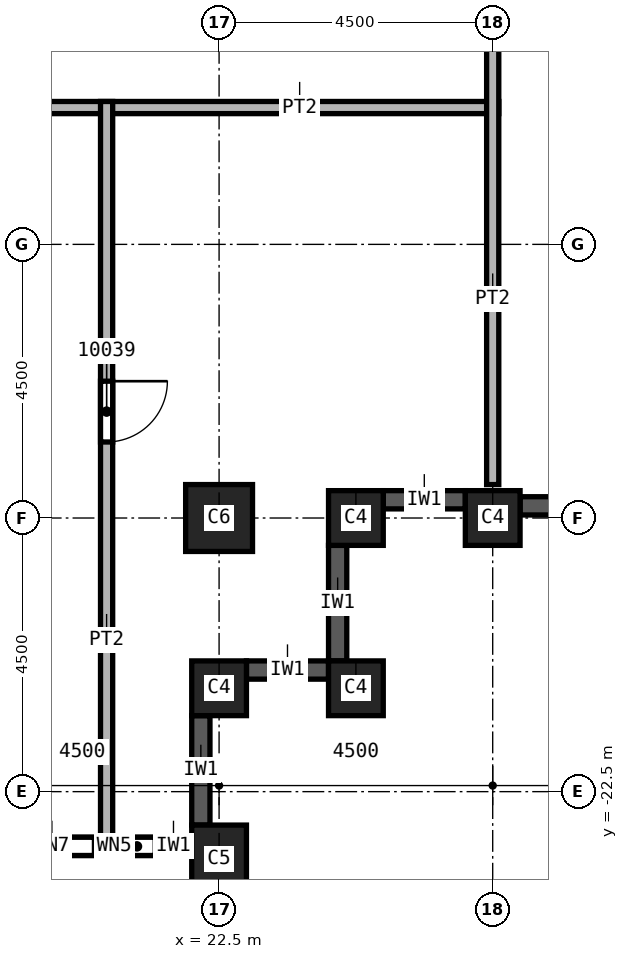
"""IFC4 building model, lengths in metres.
Left out: names, types, materials, properties, quantities, classifications, styles, units other than length and angle.
Written with IfcOpenShell. Run it as: python <this file> out.ifc"""

import sys

from ifc_helpers import new_model, si_unit, direction, frame, frame_2d, origin, origin_2d, place, context, subcontext, project, spatial, rectangle, extrude, element, fill, save


model = new_model("IFC4")
c1 = context("Model", 3, precision=1e-05, world=origin(), true_north=direction((0.0, 1.0)))
c2 = subcontext(c1, "Body", "Model", "MODEL_VIEW")
j1 = project(units=[si_unit("LENGTHUNIT", "METRE"), si_unit("PLANEANGLEUNIT", "RADIAN")], contexts=[c1])
p1 = place(None, origin())
s1 = spatial("IfcSite", under=j1, at=p1, CompositionType="ELEMENT")
p2 = place(p1, origin())
s2 = spatial("IfcBuilding", under=s1, at=p2, CompositionType="ELEMENT")
p3 = place(p2, frame((0.0, 0.0, 170.0)))
s3 = spatial("IfcBuildingStorey", under=s2, at=p3, CompositionType="ELEMENT", Elevation=170.0)
p4 = place(p3, frame((22.5, -18.0, 0.0), z_axis=(0.0, 0.0, 1.0), x_axis=(1.0, 0.0, 0.0)))
e1 = element("IfcColumn", 1, at=p4, inside=s3, PredefinedType="COLUMN", context=c2, shape_type="SweptSolid", body=[
    extrude(rectangle(XDim=1.1, YDim=1.1, at=origin_2d()), origin(), (0.0, 0.0, 1.0), 3.7),
])
p5 = place(p3, frame((27.0, -18.0, 0.0), z_axis=(0.0, 0.0, 1.0), x_axis=(1.0, 0.0, 0.0)))
e2 = element("IfcColumn", 2, at=p5, inside=s3, PredefinedType="COLUMN", context=c2, shape_type="SweptSolid", body=[
    extrude(rectangle(XDim=0.9, YDim=0.9, at=origin_2d()), origin(), (0.0, 0.0, 1.0), 3.7),
])
p6 = place(p3, frame((22.5, -23.6, 0.0), z_axis=(0.0, 0.0, 1.0), x_axis=(1.0, 0.0, 0.0)))
e3 = element("IfcColumn", 3, at=p6, inside=s3, PredefinedType="COLUMN", context=c2, shape_type="SweptSolid", body=[
    extrude(rectangle(XDim=0.9, YDim=1.1, at=origin_2d()), origin(), (0.0, 0.0, 1.0), 3.7),
])
for number, where, z_axis, x_axis in (
    (4, (22.5, -20.8, 0.0), (0.0, 0.0, 1.0), (1.0, 0.0, 0.0)),
    (5, (24.75, -20.8, 0.0), (0.0, 0.0, 1.0), (1.0, 0.0, 0.0)),
    (6, (24.75, -18.0, 0.0), (0.0, 0.0, 1.0), (1.0, 0.0, 0.0)),
):
    element("IfcColumn", number, at=place(p3, frame(where, z_axis=z_axis, x_axis=x_axis)), inside=s3, PredefinedType="COLUMN", context=c2, shape_type="SweptSolid", body=[
        extrude(rectangle(XDim=0.9, YDim=0.9, at=origin_2d()), origin(), (0.0, 0.0, 1.0), 3.7),
    ])
p7 = place(p3, frame((18.45, -23.4, 0.0), z_axis=(0.0, 0.0, 1.0), x_axis=(1.0, 0.0, 0.0)))
e7 = element("IfcWall", 7, at=p7, inside=s3, PredefinedType="SOLIDWALL", context=c2, shape_type="SweptSolid", body=[
    extrude(rectangle(XDim=3.6, YDim=0.3, at=frame_2d((1.8, 0.0))), origin(), (0.0, 0.0, 1.0), 3.1),
])
p8 = place(p7, frame((0.6, 0.0, 0.8)))
e8 = element("IfcOpeningElement", 8, at=p8, cuts=e7, PredefinedType="OPENING", context=c2, shape_type="SweptSolid", body=[
    extrude(rectangle(XDim=1.4, YDim=1.95, at=frame_2d((0.7, 0.975))), frame((0.0, 0.15, 0.0), z_axis=(0.0, -1.0, 0.0), x_axis=(1.0, 0.0, 0.0)), (0.0, 0.0, 1.0), 0.3),
])
p9 = place(p7, frame((2.4, 0.0, 0.8)))
e9 = element("IfcOpeningElement", 9, at=p9, cuts=e7, PredefinedType="OPENING", context=c2, shape_type="SweptSolid", body=[
    extrude(rectangle(XDim=0.6, YDim=1.95, at=frame_2d((0.3, 0.975))), frame((0.0, 0.15, 0.0), z_axis=(0.0, -1.0, 0.0), x_axis=(1.0, 0.0, 0.0)), (0.0, 0.0, 1.0), 0.3),
])
p10 = place(p3, frame((22.2, -23.05, 0.0), z_axis=(0.0, 0.0, 1.0), x_axis=(0.0, 1.0, 0.0)))
e10 = element("IfcWall", 10, at=p10, inside=s3, PredefinedType="SOLIDWALL", context=c2, shape_type="SweptSolid", body=[
    extrude(rectangle(XDim=1.8, YDim=0.3, at=frame_2d((0.9, 0.0))), origin(), (0.0, 0.0, 1.0), 3.1),
])
p11 = place(p3, frame((22.95, -20.5, 0.0), z_axis=(0.0, 0.0, 1.0), x_axis=(1.0, 0.0, 0.0)))
e11 = element("IfcWall", 11, at=p11, inside=s3, PredefinedType="SOLIDWALL", context=c2, shape_type="SweptSolid", body=[
    extrude(rectangle(XDim=1.35, YDim=0.3, at=frame_2d((0.675, 0.0))), origin(), (0.0, 0.0, 1.0), 3.1),
])
p12 = place(p3, frame((24.45, -20.35, 0.0), z_axis=(0.0, 0.0, 1.0), x_axis=(0.0, 1.0, 0.0)))
e12 = element("IfcWall", 12, at=p12, inside=s3, PredefinedType="SOLIDWALL", context=c2, shape_type="SweptSolid", body=[
    extrude(rectangle(XDim=1.9, YDim=0.3, at=frame_2d((0.95, 0.0))), origin(), (0.0, 0.0, 1.0), 3.1),
])
p13 = place(p3, frame((25.2, -17.7, 0.0), z_axis=(0.0, 0.0, 1.0), x_axis=(1.0, 0.0, 0.0)))
e13 = element("IfcWall", 13, at=p13, inside=s3, PredefinedType="SOLIDWALL", context=c2, shape_type="SweptSolid", body=[
    extrude(rectangle(XDim=1.35, YDim=0.3, at=frame_2d((0.675, 0.0))), origin(), (0.0, 0.0, 1.0), 3.1),
])
p14 = place(p3, frame((27.45, -17.8, 0.0), z_axis=(0.0, 0.0, 1.0), x_axis=(1.0, 0.0, 0.0)))
e14 = element("IfcWall", 14, at=p14, inside=s3, PredefinedType="SOLIDWALL", context=c2, shape_type="SweptSolid", body=[
    extrude(rectangle(XDim=3.6, YDim=0.3, at=frame_2d((1.8, 0.0))), origin(), (0.0, 0.0, 1.0), 3.1),
])
p15 = place(p14, frame((0.6, 0.0, 0.8)))
e15 = element("IfcOpeningElement", 15, at=p15, cuts=e14, PredefinedType="OPENING", context=c2, shape_type="SweptSolid", body=[
    extrude(rectangle(XDim=2.4, YDim=1.95, at=frame_2d((1.2, 0.975))), frame((0.0, 0.15, 0.0), z_axis=(0.0, -1.0, 0.0), x_axis=(1.0, 0.0, 0.0)), (0.0, 0.0, 1.0), 0.3),
])
p16 = place(p3, frame((15.4, -11.25, 0.0), z_axis=(0.0, 0.0, 1.0), x_axis=(1.0, 0.0, 0.0)))
e16 = element("IfcWall", 16, at=p16, inside=s3, PredefinedType="PARTITIONING", context=c2, shape_type="SweptSolid", body=[
    extrude(rectangle(XDim=11.7, YDim=0.2, at=frame_2d((5.85, 0.0))), origin(), (0.0, 0.0, 1.0), 3.7),
])
p17 = place(p3, frame((20.65, -11.15, 0.0), z_axis=(0.0, 0.0, 1.0), x_axis=(0.0, -1.0, 0.0)))
e17 = element("IfcWall", 17, at=p17, inside=s3, PredefinedType="PARTITIONING", context=c2, shape_type="SweptSolid", body=[
    extrude(rectangle(XDim=12.1, YDim=0.2, at=frame_2d((6.05, 0.0))), origin(), (0.0, 0.0, 1.0), 3.7),
])
p18 = place(p17, frame((4.6, 0.0, 0.0)))
e18 = element("IfcOpeningElement", 18, at=p18, cuts=e17, PredefinedType="OPENING", context=c2, shape_type="SweptSolid", body=[
    extrude(rectangle(XDim=1.0, YDim=2.1, at=frame_2d((0.5, 1.05))), frame((0.0, 0.1, 0.0), z_axis=(0.0, -1.0, 0.0), x_axis=(1.0, 0.0, 0.0)), (0.0, 0.0, 1.0), 0.2),
])
p19 = place(p3, frame((27.0, -3.75, 0.0), z_axis=(0.0, 0.0, 1.0), x_axis=(0.0, -1.0, 0.0)))
e19 = element("IfcWall", 19, at=p19, inside=s3, PredefinedType="PARTITIONING", context=c2, shape_type="SweptSolid", body=[
    extrude(rectangle(XDim=13.7, YDim=0.2, at=frame_2d((6.85, 0.0))), origin(), (0.0, 0.0, 1.0), 3.7),
])
p20 = place(p18, origin())
e20 = element("IfcDoor", 20, at=p20, inside=s3, OperationType="SINGLE_SWING_RIGHT", PredefinedType="DOOR", context=c2, shape_type="SweptSolid", body=[
    extrude(rectangle(XDim=1.0, YDim=2.1, at=frame_2d((0.5, 1.05))), frame((0.0, 0.025, 0.0), z_axis=(0.0, -1.0, 0.0), x_axis=(1.0, 0.0, 0.0)), (0.0, 0.0, 1.0), 0.05),
])
fill(e18, e20)
p21 = place(p8, origin())
e21 = element("IfcWindow", 21, at=p21, inside=s3, PartitioningType="SINGLE_PANEL", PredefinedType="WINDOW", context=c2, shape_type="SweptSolid", body=[
    extrude(rectangle(XDim=1.4, YDim=1.95, at=frame_2d((0.7, 0.975))), frame((0.0, 0.03, 0.0), z_axis=(0.0, -1.0, 0.0), x_axis=(1.0, 0.0, 0.0)), (0.0, 0.0, 1.0), 0.06),
])
fill(e8, e21)
p22 = place(p9, origin())
e22 = element("IfcWindow", 22, at=p22, inside=s3, PartitioningType="SINGLE_PANEL", PredefinedType="WINDOW", context=c2, shape_type="SweptSolid", body=[
    extrude(rectangle(XDim=0.6, YDim=1.95, at=frame_2d((0.3, 0.975))), frame((0.0, 0.03, 0.0), z_axis=(0.0, -1.0, 0.0), x_axis=(1.0, 0.0, 0.0)), (0.0, 0.0, 1.0), 0.06),
])
fill(e9, e22)
save(model, sys.argv[1])
